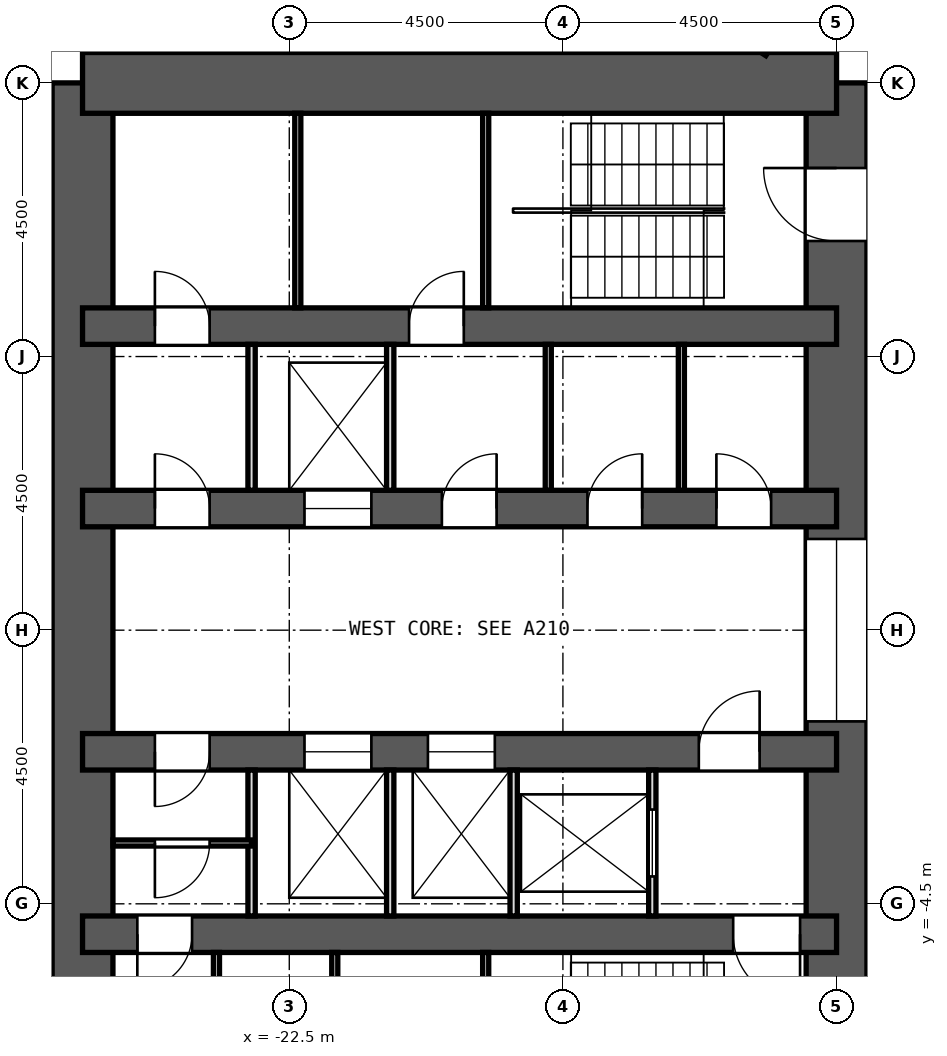
"""IFC4 building model, lengths in metres.
Left out: names, types, materials, properties, quantities, classifications, styles, units other than length and angle.
Written with IfcOpenShell. Run it as: python <this file> out.ifc"""

import sys

from ifc_helpers import new_model, si_unit, direction, frame, frame_2d, origin, place, context, subcontext, project, spatial, rectangle, extrude, element, fill, save


model = new_model("IFC4")
c1 = context("Model", 3, precision=1e-05, world=origin(), true_north=direction((0.0, 1.0)))
c2 = subcontext(c1, "Body", "Model", "MODEL_VIEW")
j1 = project(units=[si_unit("LENGTHUNIT", "METRE"), si_unit("PLANEANGLEUNIT", "RADIAN")], contexts=[c1])
p1 = place(None, origin())
s1 = spatial("IfcSite", under=j1, at=p1, CompositionType="ELEMENT")
p2 = place(p1, origin())
s2 = spatial("IfcBuilding", under=s1, at=p2, CompositionType="ELEMENT")
p3 = place(p2, frame((0.0, 0.0, 36.2)))
s3 = spatial("IfcBuildingStorey", under=s2, at=p3, CompositionType="ELEMENT", Elevation=36.2)
p4 = place(p3, frame((-13.5, -9.0, 0.0), z_axis=(0.0, 0.0, 1.0), x_axis=(0.0, 1.0, 0.0)))
e1 = element("IfcWall", 1, at=p4, inside=s3, PredefinedType="SHEAR", context=c2, shape_type="SweptSolid", body=[
    extrude(rectangle(XDim=18.0, YDim=1.0, at=frame_2d((9.0, 0.0))), origin(), (0.0, 0.0, 1.0), 3.3),
])
p5 = place(p4, frame((15.4, 0.0, 0.0)))
e2 = element("IfcOpeningElement", 2, at=p5, cuts=e1, PredefinedType="OPENING", context=c2, shape_type="SweptSolid", body=[
    extrude(rectangle(XDim=1.2, YDim=2.1, at=frame_2d((0.6, 1.05))), frame((0.0, 0.512, 0.0), z_axis=(0.0, -1.0, 0.0), x_axis=(1.0, 0.0, 0.0)), (0.0, 0.0, 1.0), 1.024),
])
p6 = place(p4, frame((1.4, 0.0, 0.0)))
e3 = element("IfcOpeningElement", 3, at=p6, cuts=e1, PredefinedType="OPENING", context=c2, shape_type="SweptSolid", body=[
    extrude(rectangle(XDim=1.2, YDim=2.1, at=frame_2d((0.6, 1.05))), frame((0.0, 0.512, 0.0), z_axis=(0.0, -1.0, 0.0), x_axis=(1.0, 0.0, 0.0)), (0.0, 0.0, 1.0), 1.024),
])
p7 = place(p4, frame((7.5, 0.0, 0.0)))
e4 = element("IfcOpeningElement", 4, at=p7, cuts=e1, PredefinedType="OPENING", context=c2, shape_type="SweptSolid", body=[
    extrude(rectangle(XDim=3.0, YDim=2.4, at=frame_2d((1.5, 1.2))), frame((0.0, 0.512, 0.0), z_axis=(0.0, -1.0, 0.0), x_axis=(1.0, 0.0, 0.0)), (0.0, 0.0, 1.0), 1.024),
])
p8 = place(p3, frame((-25.9, -9.0, 0.0), z_axis=(0.0, 0.0, 1.0), x_axis=(0.0, 1.0, 0.0)))
e5 = element("IfcWall", 5, at=p8, inside=s3, PredefinedType="SHEAR", context=c2, shape_type="SweptSolid", body=[
    extrude(rectangle(XDim=18.0, YDim=1.0, at=frame_2d((9.0, 0.0))), origin(), (0.0, 0.0, 1.0), 3.3),
])
p9 = place(p3, frame((-13.5, 9.0, 0.0), z_axis=(0.0, 0.0, 1.0), x_axis=(-1.0, 0.0, 0.0)))
e6 = element("IfcWall", 6, at=p9, inside=s3, PredefinedType="SHEAR", context=c2, shape_type="SweptSolid", body=[
    extrude(rectangle(XDim=12.4, YDim=1.0, at=frame_2d((6.2, 0.0))), origin(), (0.0, 0.0, 1.0), 3.3),
])
p10 = place(p3, frame((-13.5, 5.0, 0.0), z_axis=(0.0, 0.0, 1.0), x_axis=(-1.0, 0.0, 0.0)))
e7 = element("IfcWall", 7, at=p10, inside=s3, PredefinedType="SHEAR", context=c2, shape_type="SweptSolid", body=[
    extrude(rectangle(XDim=12.4, YDim=0.6, at=frame_2d((6.2, 0.0))), origin(), (0.0, 0.0, 1.0), 3.3),
])
p11 = place(p10, frame((6.13, 0.0, 0.0)))
e8 = element("IfcOpeningElement", 8, at=p11, cuts=e7, PredefinedType="OPENING", context=c2, shape_type="SweptSolid", body=[
    extrude(rectangle(XDim=0.9, YDim=2.1, at=frame_2d((0.45, 1.05))), frame((0.0, 0.312, 0.0), z_axis=(0.0, -1.0, 0.0), x_axis=(1.0, 0.0, 0.0)), (0.0, 0.0, 1.0), 0.624),
])
p12 = place(p10, frame((10.31, 0.0, 0.0)))
e9 = element("IfcOpeningElement", 9, at=p12, cuts=e7, PredefinedType="OPENING", context=c2, shape_type="SweptSolid", body=[
    extrude(rectangle(XDim=0.9, YDim=2.1, at=frame_2d((0.45, 1.05))), frame((0.0, 0.312, 0.0), z_axis=(0.0, -1.0, 0.0), x_axis=(1.0, 0.0, 0.0)), (0.0, 0.0, 1.0), 0.624),
])
p13 = place(p3, frame((-13.5, -5.0, 0.0), z_axis=(0.0, 0.0, 1.0), x_axis=(-1.0, 0.0, 0.0)))
e10 = element("IfcWall", 10, at=p13, inside=s3, PredefinedType="SHEAR", context=c2, shape_type="SweptSolid", body=[
    extrude(rectangle(XDim=12.4, YDim=0.6, at=frame_2d((6.2, 0.0))), origin(), (0.0, 0.0, 1.0), 3.3),
])
p14 = place(p13, frame((10.599, 0.0, 0.0)))
e11 = element("IfcOpeningElement", 11, at=p14, cuts=e10, PredefinedType="OPENING", context=c2, shape_type="SweptSolid", body=[
    extrude(rectangle(XDim=0.9, YDim=2.1, at=frame_2d((0.45, 1.05))), frame((0.0, 0.312, 0.0), z_axis=(0.0, -1.0, 0.0), x_axis=(1.0, 0.0, 0.0)), (0.0, 0.0, 1.0), 0.624),
])
p15 = place(p13, frame((0.6, 0.0, 0.0)))
e12 = element("IfcOpeningElement", 12, at=p15, cuts=e10, PredefinedType="OPENING", context=c2, shape_type="SweptSolid", body=[
    extrude(rectangle(XDim=1.1, YDim=2.1, at=frame_2d((0.55, 1.05))), frame((0.0, 0.312, 0.0), z_axis=(0.0, -1.0, 0.0), x_axis=(1.0, 0.0, 0.0)), (0.0, 0.0, 1.0), 0.624),
])
p16 = place(p3, frame((-13.5, 2.0, 0.0), z_axis=(0.0, 0.0, 1.0), x_axis=(-1.0, 0.0, 0.0)))
e13 = element("IfcWall", 13, at=p16, inside=s3, PredefinedType="SHEAR", context=c2, shape_type="SweptSolid", body=[
    extrude(rectangle(XDim=12.4, YDim=0.6, at=frame_2d((6.2, 0.0))), origin(), (0.0, 0.0, 1.0), 3.3),
])
p17 = place(p16, frame((7.65, 0.0, 0.0)))
e14 = element("IfcOpeningElement", 14, at=p17, cuts=e13, PredefinedType="OPENING", context=c2, shape_type="SweptSolid", body=[
    extrude(rectangle(XDim=1.1, YDim=2.1, at=frame_2d((0.55, 1.05))), frame((0.0, 0.312, 0.0), z_axis=(0.0, -1.0, 0.0), x_axis=(1.0, 0.0, 0.0)), (0.0, 0.0, 1.0), 0.624),
])
p18 = place(p16, frame((1.076, 0.0, 0.0)))
e15 = element("IfcOpeningElement", 15, at=p18, cuts=e13, PredefinedType="OPENING", context=c2, shape_type="SweptSolid", body=[
    extrude(rectangle(XDim=0.9, YDim=2.1, at=frame_2d((0.45, 1.05))), frame((0.0, 0.312, 0.0), z_axis=(0.0, -1.0, 0.0), x_axis=(1.0, 0.0, 0.0)), (0.0, 0.0, 1.0), 0.624),
])
p19 = place(p16, frame((3.196, 0.0, 0.0)))
e16 = element("IfcOpeningElement", 16, at=p19, cuts=e13, PredefinedType="OPENING", context=c2, shape_type="SweptSolid", body=[
    extrude(rectangle(XDim=0.9, YDim=2.1, at=frame_2d((0.45, 1.05))), frame((0.0, 0.312, 0.0), z_axis=(0.0, -1.0, 0.0), x_axis=(1.0, 0.0, 0.0)), (0.0, 0.0, 1.0), 0.624),
])
p20 = place(p16, frame((5.59, 0.0, 0.0)))
e17 = element("IfcOpeningElement", 17, at=p20, cuts=e13, PredefinedType="OPENING", context=c2, shape_type="SweptSolid", body=[
    extrude(rectangle(XDim=0.9, YDim=2.1, at=frame_2d((0.45, 1.05))), frame((0.0, 0.312, 0.0), z_axis=(0.0, -1.0, 0.0), x_axis=(1.0, 0.0, 0.0)), (0.0, 0.0, 1.0), 0.624),
])
p21 = place(p16, frame((10.31, 0.0, 0.0)))
e18 = element("IfcOpeningElement", 18, at=p21, cuts=e13, PredefinedType="OPENING", context=c2, shape_type="SweptSolid", body=[
    extrude(rectangle(XDim=0.9, YDim=2.1, at=frame_2d((0.45, 1.05))), frame((0.0, 0.312, 0.0), z_axis=(0.0, -1.0, 0.0), x_axis=(1.0, 0.0, 0.0)), (0.0, 0.0, 1.0), 0.624),
])
p22 = place(p3, frame((-13.5, -2.0, 0.0), z_axis=(0.0, 0.0, 1.0), x_axis=(-1.0, 0.0, 0.0)))
e19 = element("IfcWall", 19, at=p22, inside=s3, PredefinedType="SHEAR", context=c2, shape_type="SweptSolid", body=[
    extrude(rectangle(XDim=12.4, YDim=0.6, at=frame_2d((6.2, 0.0))), origin(), (0.0, 0.0, 1.0), 3.3),
])
p23 = place(p22, frame((5.62, 0.0, 0.0)))
e20 = element("IfcOpeningElement", 20, at=p23, cuts=e19, PredefinedType="OPENING", context=c2, shape_type="SweptSolid", body=[
    extrude(rectangle(XDim=1.1, YDim=2.1, at=frame_2d((0.55, 1.05))), frame((0.0, 0.312, 0.0), z_axis=(0.0, -1.0, 0.0), x_axis=(1.0, 0.0, 0.0)), (0.0, 0.0, 1.0), 0.624),
])
p24 = place(p22, frame((7.65, 0.0, 0.0)))
e21 = element("IfcOpeningElement", 21, at=p24, cuts=e19, PredefinedType="OPENING", context=c2, shape_type="SweptSolid", body=[
    extrude(rectangle(XDim=1.1, YDim=2.1, at=frame_2d((0.55, 1.05))), frame((0.0, 0.312, 0.0), z_axis=(0.0, -1.0, 0.0), x_axis=(1.0, 0.0, 0.0)), (0.0, 0.0, 1.0), 0.624),
])
p25 = place(p22, frame((1.265, 0.0, 0.0)))
e22 = element("IfcOpeningElement", 22, at=p25, cuts=e19, PredefinedType="OPENING", context=c2, shape_type="SweptSolid", body=[
    extrude(rectangle(XDim=1.0, YDim=2.1, at=frame_2d((0.5, 1.05))), frame((0.0, 0.312, 0.0), z_axis=(0.0, -1.0, 0.0), x_axis=(1.0, 0.0, 0.0)), (0.0, 0.0, 1.0), 0.624),
])
p26 = place(p22, frame((10.31, 0.0, 0.0)))
e23 = element("IfcOpeningElement", 23, at=p26, cuts=e19, PredefinedType="OPENING", context=c2, shape_type="SweptSolid", body=[
    extrude(rectangle(XDim=0.9, YDim=2.1, at=frame_2d((0.45, 1.05))), frame((0.0, 0.312, 0.0), z_axis=(0.0, -1.0, 0.0), x_axis=(1.0, 0.0, 0.0)), (0.0, 0.0, 1.0), 0.624),
])
p27 = place(p3, frame((-26.208, 11.585, 0.0), z_axis=(0.0, 0.0, 1.0), x_axis=(-0.342028474173, -0.939689588564, 0.0)))
e24 = element("IfcWall", 24, at=p27, inside=s3, PredefinedType="SOLIDWALL", context=c2, shape_type="SweptSolid", body=[
    extrude(rectangle(XDim=3.846, YDim=0.6, at=frame_2d((1.923, 0.0))), origin(), (0.0, 0.0, 1.0), 2.75),
])
p28 = place(p3, frame((-15.453, 10.035, 0.0), z_axis=(0.0, 0.0, 1.0), x_axis=(0.838755766808, -0.544507817801, 0.0)))
e25 = element("IfcWall", 25, at=p28, inside=s3, PredefinedType="PARTITIONING", context=c2, shape_type="SweptSolid", body=[
    extrude(rectangle(XDim=0.982, YDim=0.125, at=frame_2d((0.491, 0.0))), origin(), (0.0, 0.0, 1.0), 2.75),
])
for number, where, z_axis, x_axis in (
    (26, (-16.052, 2.3, 0.0), (0.0, 0.0, 1.0), (0.0, 1.0, 0.0)),
    (27, (-18.241, 2.3, 0.0), (0.0, 0.0, 1.0), (0.0, 1.0, 0.0)),
):
    element("IfcWall", number, at=place(p3, frame(where, z_axis=z_axis, x_axis=x_axis)), inside=s3, PredefinedType="PARTITIONING", context=c2, shape_type="SweptSolid", body=[
        extrude(rectangle(XDim=2.4, YDim=0.1, at=frame_2d((1.2, 0.0))), origin(), (0.0, 0.0, 1.0), 2.75),
    ])
for number, where, z_axis, x_axis in (
    (28, (-20.84, 2.3, 0.0), (0.0, 0.0, 1.0), (0.0, 1.0, 0.0)),
    (29, (-23.12, 2.3, 0.0), (0.0, 0.0, 1.0), (0.0, 1.0, 0.0)),
):
    element("IfcWall", number, at=place(p3, frame(where, z_axis=z_axis, x_axis=x_axis)), inside=s3, PredefinedType="PARTITIONING", context=c2, shape_type="SweptSolid", body=[
        extrude(rectangle(XDim=2.4, YDim=0.12, at=frame_2d((1.2, 0.0))), origin(), (0.0, 0.0, 1.0), 2.75),
    ])
p29 = place(p3, frame((-16.53, -4.7, 0.0), z_axis=(0.0, 0.0, 1.0), x_axis=(0.0, 1.0, 0.0)))
e30 = element("IfcWall", 30, at=p29, inside=s3, PredefinedType="PARTITIONING", context=c2, shape_type="SweptSolid", body=[
    extrude(rectangle(XDim=2.4, YDim=0.12, at=frame_2d((1.2, 0.0))), origin(), (0.0, 0.0, 1.0), 2.75),
])
p30 = place(p29, frame((0.65, 0.0, 0.0)))
e31 = element("IfcOpeningElement", 31, at=p30, cuts=e30, PredefinedType="OPENING", context=c2, shape_type="SweptSolid", body=[
    extrude(rectangle(XDim=1.1, YDim=2.1, at=frame_2d((0.55, 1.05))), frame((0.0, 0.072, 0.0), z_axis=(0.0, -1.0, 0.0), x_axis=(1.0, 0.0, 0.0)), (0.0, 0.0, 1.0), 0.144),
])
for number, where, z_axis, x_axis in (
    (32, (-18.81, -4.7, 0.0), (0.0, 0.0, 1.0), (0.0, 1.0, 0.0)),
    (33, (-20.84, -4.7, 0.0), (0.0, 0.0, 1.0), (0.0, 1.0, 0.0)),
    (34, (-23.12, -4.7, 0.0), (0.0, 0.0, 1.0), (0.0, 1.0, 0.0)),
):
    element("IfcWall", number, at=place(p3, frame(where, z_axis=z_axis, x_axis=x_axis)), inside=s3, PredefinedType="PARTITIONING", context=c2, shape_type="SweptSolid", body=[
        extrude(rectangle(XDim=2.4, YDim=0.12, at=frame_2d((1.2, 0.0))), origin(), (0.0, 0.0, 1.0), 2.75),
    ])
p31 = place(p3, frame((-23.12, -3.5, 0.0), z_axis=(0.0, 0.0, 1.0), x_axis=(-1.0, 0.0, 0.0)))
e35 = element("IfcWall", 35, at=p31, inside=s3, PredefinedType="PARTITIONING", context=c2, shape_type="SweptSolid", body=[
    extrude(rectangle(XDim=2.28, YDim=0.1, at=frame_2d((1.14, 0.0))), origin(), (0.0, 0.0, 1.0), 2.75),
])
p32 = place(p31, frame((0.69, 0.0, 0.0)))
e36 = element("IfcOpeningElement", 36, at=p32, cuts=e35, PredefinedType="OPENING", context=c2, shape_type="SweptSolid", body=[
    extrude(rectangle(XDim=0.9, YDim=2.1, at=frame_2d((0.45, 1.05))), frame((0.0, 0.062, 0.0), z_axis=(0.0, -1.0, 0.0), x_axis=(1.0, 0.0, 0.0)), (0.0, 0.0, 1.0), 0.124),
])
for number, where, z_axis, x_axis in (
    (37, (-19.27, 5.3, 0.0), (0.0, 0.0, 1.0), (0.0, 1.0, 0.0)),
    (38, (-22.36, 5.3, 0.0), (0.0, 0.0, 1.0), (0.0, 1.0, 0.0)),
    (39, (-19.27, -8.5, 0.0), (0.0, 0.0, 1.0), (0.0, 1.0, 0.0)),
):
    element("IfcWall", number, at=place(p3, frame(where, z_axis=z_axis, x_axis=x_axis)), inside=s3, PredefinedType="PARTITIONING", context=c2, shape_type="SweptSolid", body=[
        extrude(rectangle(XDim=3.2, YDim=0.1, at=frame_2d((1.6, 0.0))), origin(), (0.0, 0.0, 1.0), 2.75),
    ])
p33 = place(p3, frame((-21.752, -8.5, 0.0), z_axis=(0.0, 0.0, 1.0), x_axis=(0.0, 1.0, 0.0)))
e40 = element("IfcWall", 40, at=p33, inside=s3, PredefinedType="PARTITIONING", context=c2, shape_type="SweptSolid", body=[
    extrude(rectangle(XDim=3.2, YDim=0.1, at=frame_2d((1.6, 0.0))), origin(), (0.0, 0.0, 1.0), 2.75),
])
p34 = place(p33, frame((1.15, 0.0, 0.0)))
e41 = element("IfcOpeningElement", 41, at=p34, cuts=e40, PredefinedType="OPENING", context=c2, shape_type="SweptSolid", body=[
    extrude(rectangle(XDim=0.9, YDim=2.1, at=frame_2d((0.45, 1.05))), frame((0.0, 0.062, 0.0), z_axis=(0.0, -1.0, 0.0), x_axis=(1.0, 0.0, 0.0)), (0.0, 0.0, 1.0), 0.124),
])
p35 = place(p3, frame((-23.698, -8.5, 0.0), z_axis=(0.0, 0.0, 1.0), x_axis=(0.0, 1.0, 0.0)))
e42 = element("IfcWall", 42, at=p35, inside=s3, PredefinedType="PARTITIONING", context=c2, shape_type="SweptSolid", body=[
    extrude(rectangle(XDim=3.2, YDim=0.1, at=frame_2d((1.6, 0.0))), origin(), (0.0, 0.0, 1.0), 2.75),
])
p36 = place(p35, frame((1.15, 0.0, 0.0)))
e43 = element("IfcOpeningElement", 43, at=p36, cuts=e42, PredefinedType="OPENING", context=c2, shape_type="SweptSolid", body=[
    extrude(rectangle(XDim=0.9, YDim=2.1, at=frame_2d((0.45, 1.05))), frame((0.0, 0.062, 0.0), z_axis=(0.0, -1.0, 0.0), x_axis=(1.0, 0.0, 0.0)), (0.0, 0.0, 1.0), 0.124),
])
p37 = place(p17, origin())
e44 = element("IfcDoor", 44, at=p37, inside=s3, OperationType="DOUBLE_DOOR_SLIDING", PredefinedType="DOOR", context=c2, shape_type="SweptSolid", body=[
    extrude(rectangle(XDim=1.1, YDim=2.1, at=frame_2d((0.55, 1.05))), frame((0.0, 0.025, 0.0), z_axis=(0.0, -1.0, 0.0), x_axis=(1.0, 0.0, 0.0)), (0.0, 0.0, 1.0), 0.05),
])
fill(e14, e44)
p38 = place(p30, origin())
e45 = element("IfcDoor", 45, at=p38, inside=s3, OperationType="DOUBLE_DOOR_SLIDING", PredefinedType="DOOR", context=c2, shape_type="SweptSolid", body=[
    extrude(rectangle(XDim=1.1, YDim=2.1, at=frame_2d((0.55, 1.05))), frame((0.0, 0.025, 0.0), z_axis=(0.0, -1.0, 0.0), x_axis=(1.0, 0.0, 0.0)), (0.0, 0.0, 1.0), 0.05),
])
fill(e31, e45)
p39 = place(p23, origin())
e46 = element("IfcDoor", 46, at=p39, inside=s3, OperationType="DOUBLE_DOOR_SLIDING", PredefinedType="DOOR", context=c2, shape_type="SweptSolid", body=[
    extrude(rectangle(XDim=1.1, YDim=2.1, at=frame_2d((0.55, 1.05))), frame((0.0, 0.025, 0.0), z_axis=(0.0, -1.0, 0.0), x_axis=(1.0, 0.0, 0.0)), (0.0, 0.0, 1.0), 0.05),
])
fill(e20, e46)
p40 = place(p24, origin())
e47 = element("IfcDoor", 47, at=p40, inside=s3, OperationType="DOUBLE_DOOR_SLIDING", PredefinedType="DOOR", context=c2, shape_type="SweptSolid", body=[
    extrude(rectangle(XDim=1.1, YDim=2.1, at=frame_2d((0.55, 1.05))), frame((0.0, 0.025, 0.0), z_axis=(0.0, -1.0, 0.0), x_axis=(1.0, 0.0, 0.0)), (0.0, 0.0, 1.0), 0.05),
])
fill(e21, e47)
p41 = place(p18, frame((0.9, 0.0, 0.0), z_axis=(0.0, 0.0, 1.0), x_axis=(-1.0, 0.0, 0.0)))
e48 = element("IfcDoor", 48, at=p41, inside=s3, OperationType="SINGLE_SWING_LEFT", PredefinedType="DOOR", context=c2, shape_type="SweptSolid", body=[
    extrude(rectangle(XDim=0.9, YDim=2.1, at=frame_2d((0.45, 1.05))), frame((0.0, 0.025, 0.0), z_axis=(0.0, -1.0, 0.0), x_axis=(1.0, 0.0, 0.0)), (0.0, 0.0, 1.0), 0.05),
])
fill(e15, e48)
p42 = place(p19, frame((0.9, 0.0, 0.0), z_axis=(0.0, 0.0, 1.0), x_axis=(-1.0, 0.0, 0.0)))
e49 = element("IfcDoor", 49, at=p42, inside=s3, OperationType="SINGLE_SWING_RIGHT", PredefinedType="DOOR", context=c2, shape_type="SweptSolid", body=[
    extrude(rectangle(XDim=0.9, YDim=2.1, at=frame_2d((0.45, 1.05))), frame((0.0, 0.025, 0.0), z_axis=(0.0, -1.0, 0.0), x_axis=(1.0, 0.0, 0.0)), (0.0, 0.0, 1.0), 0.05),
])
fill(e16, e49)
p43 = place(p20, frame((0.9, 0.0, 0.0), z_axis=(0.0, 0.0, 1.0), x_axis=(-1.0, 0.0, 0.0)))
e50 = element("IfcDoor", 50, at=p43, inside=s3, OperationType="SINGLE_SWING_RIGHT", PredefinedType="DOOR", context=c2, shape_type="SweptSolid", body=[
    extrude(rectangle(XDim=0.9, YDim=2.1, at=frame_2d((0.45, 1.05))), frame((0.0, 0.025, 0.0), z_axis=(0.0, -1.0, 0.0), x_axis=(1.0, 0.0, 0.0)), (0.0, 0.0, 1.0), 0.05),
])
fill(e17, e50)
p44 = place(p21, frame((0.9, 0.0, 0.0), z_axis=(0.0, 0.0, 1.0), x_axis=(-1.0, 0.0, 0.0)))
e51 = element("IfcDoor", 51, at=p44, inside=s3, OperationType="SINGLE_SWING_LEFT", PredefinedType="DOOR", context=c2, shape_type="SweptSolid", body=[
    extrude(rectangle(XDim=0.9, YDim=2.1, at=frame_2d((0.45, 1.05))), frame((0.0, 0.025, 0.0), z_axis=(0.0, -1.0, 0.0), x_axis=(1.0, 0.0, 0.0)), (0.0, 0.0, 1.0), 0.05),
])
fill(e18, e51)
p45 = place(p25, frame((1.0, 0.0, 0.0), z_axis=(0.0, 0.0, 1.0), x_axis=(-1.0, 0.0, 0.0)))
e52 = element("IfcDoor", 52, at=p45, inside=s3, OperationType="SINGLE_SWING_RIGHT", PredefinedType="DOOR", context=c2, shape_type="SweptSolid", body=[
    extrude(rectangle(XDim=1.0, YDim=2.1, at=frame_2d((0.5, 1.05))), frame((0.0, 0.025, 0.0), z_axis=(0.0, -1.0, 0.0), x_axis=(1.0, 0.0, 0.0)), (0.0, 0.0, 1.0), 0.05),
])
fill(e22, e52)
p46 = place(p26, origin())
e53 = element("IfcDoor", 53, at=p46, inside=s3, OperationType="SINGLE_SWING_RIGHT", PredefinedType="DOOR", context=c2, shape_type="SweptSolid", body=[
    extrude(rectangle(XDim=0.9, YDim=2.1, at=frame_2d((0.45, 1.05))), frame((0.0, 0.025, 0.0), z_axis=(0.0, -1.0, 0.0), x_axis=(1.0, 0.0, 0.0)), (0.0, 0.0, 1.0), 0.05),
])
fill(e23, e53)
p47 = place(p11, frame((0.9, 0.0, 0.0), z_axis=(0.0, 0.0, 1.0), x_axis=(-1.0, 0.0, 0.0)))
e54 = element("IfcDoor", 54, at=p47, inside=s3, OperationType="SINGLE_SWING_RIGHT", PredefinedType="DOOR", context=c2, shape_type="SweptSolid", body=[
    extrude(rectangle(XDim=0.9, YDim=2.1, at=frame_2d((0.45, 1.05))), frame((0.0, 0.025, 0.0), z_axis=(0.0, -1.0, 0.0), x_axis=(1.0, 0.0, 0.0)), (0.0, 0.0, 1.0), 0.05),
])
fill(e8, e54)
p48 = place(p12, frame((0.9, 0.0, 0.0), z_axis=(0.0, 0.0, 1.0), x_axis=(-1.0, 0.0, 0.0)))
e55 = element("IfcDoor", 55, at=p48, inside=s3, OperationType="SINGLE_SWING_LEFT", PredefinedType="DOOR", context=c2, shape_type="SweptSolid", body=[
    extrude(rectangle(XDim=0.9, YDim=2.1, at=frame_2d((0.45, 1.05))), frame((0.0, 0.025, 0.0), z_axis=(0.0, -1.0, 0.0), x_axis=(1.0, 0.0, 0.0)), (0.0, 0.0, 1.0), 0.05),
])
fill(e9, e55)
p49 = place(p32, origin())
e56 = element("IfcDoor", 56, at=p49, inside=s3, OperationType="SINGLE_SWING_RIGHT", PredefinedType="DOOR", context=c2, shape_type="SweptSolid", body=[
    extrude(rectangle(XDim=0.9, YDim=2.1, at=frame_2d((0.45, 1.05))), frame((0.0, 0.025, 0.0), z_axis=(0.0, -1.0, 0.0), x_axis=(1.0, 0.0, 0.0)), (0.0, 0.0, 1.0), 0.05),
])
fill(e36, e56)
p50 = place(p14, origin())
e57 = element("IfcDoor", 57, at=p50, inside=s3, OperationType="SINGLE_SWING_RIGHT", PredefinedType="DOOR", context=c2, shape_type="SweptSolid", body=[
    extrude(rectangle(XDim=0.9, YDim=2.1, at=frame_2d((0.45, 1.05))), frame((0.0, 0.025, 0.0), z_axis=(0.0, -1.0, 0.0), x_axis=(1.0, 0.0, 0.0)), (0.0, 0.0, 1.0), 0.05),
])
fill(e11, e57)
p51 = place(p15, origin())
e58 = element("IfcDoor", 58, at=p51, inside=s3, OperationType="SINGLE_SWING_LEFT", PredefinedType="DOOR", context=c2, shape_type="SweptSolid", body=[
    extrude(rectangle(XDim=1.1, YDim=2.1, at=frame_2d((0.55, 1.05))), frame((0.0, 0.025, 0.0), z_axis=(0.0, -1.0, 0.0), x_axis=(1.0, 0.0, 0.0)), (0.0, 0.0, 1.0), 0.05),
])
fill(e12, e58)
p52 = place(p5, origin())
e59 = element("IfcDoor", 59, at=p52, inside=s3, OperationType="SINGLE_SWING_RIGHT", PredefinedType="DOOR", context=c2, shape_type="SweptSolid", body=[
    extrude(rectangle(XDim=1.2, YDim=2.1, at=frame_2d((0.6, 1.05))), frame((0.0, 0.025, 0.0), z_axis=(0.0, -1.0, 0.0), x_axis=(1.0, 0.0, 0.0)), (0.0, 0.0, 1.0), 0.05),
])
fill(e2, e59)
p53 = place(p7, origin())
e60 = element("IfcDoor", 60, at=p53, inside=s3, OperationType="DOUBLE_DOOR_SLIDING", PredefinedType="DOOR", context=c2, shape_type="SweptSolid", body=[
    extrude(rectangle(XDim=3.0, YDim=2.4, at=frame_2d((1.5, 1.2))), frame((0.0, 0.025, 0.0), z_axis=(0.0, -1.0, 0.0), x_axis=(1.0, 0.0, 0.0)), (0.0, 0.0, 1.0), 0.05),
])
fill(e4, e60)
save(model, sys.argv[1])
